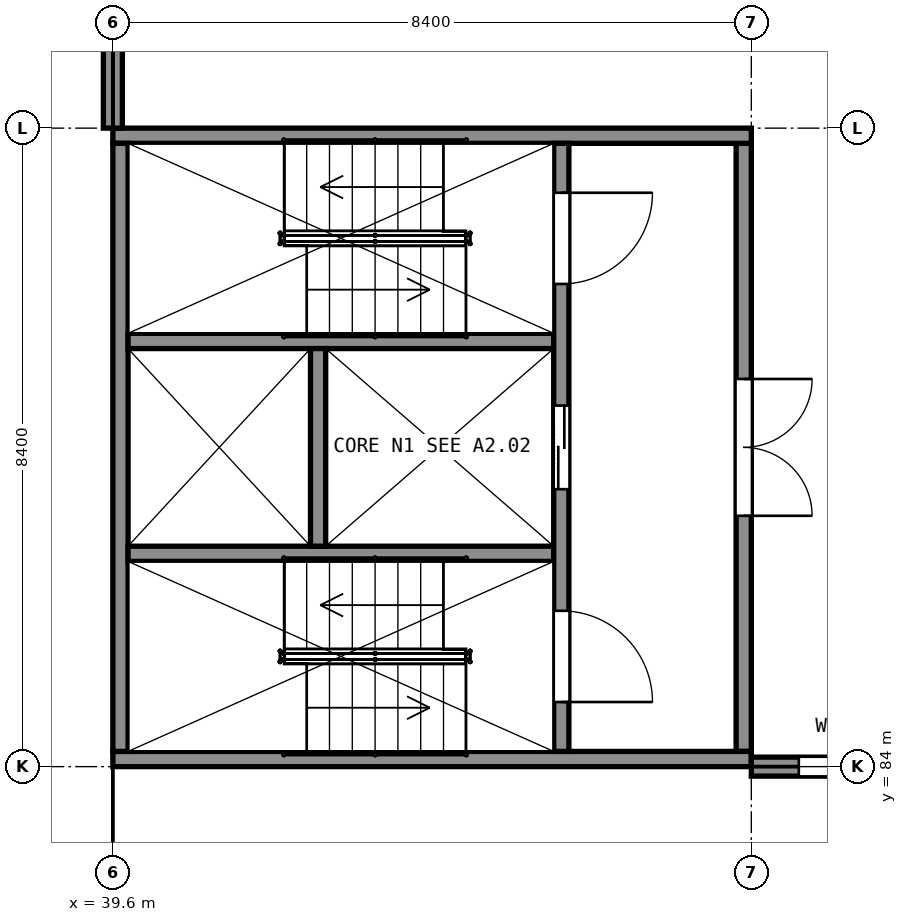
"""IFC4 building model, lengths in metres.
Left out: names, types, materials, properties, quantities, classifications, styles, units other than length and angle.
Written with IfcOpenShell. Run it as: python <this file> out.ifc"""

import sys

from ifc_helpers import new_model, si_unit, direction, frame, frame_2d, origin, place, context, subcontext, project, spatial, rectangle, extrude, element, fill, save


model = new_model("IFC4")
c1 = context("Model", 3, precision=1e-05, world=origin(), true_north=direction((0.0, 1.0)))
c2 = subcontext(c1, "Body", "Model", "MODEL_VIEW")
j1 = project(units=[si_unit("LENGTHUNIT", "METRE"), si_unit("PLANEANGLEUNIT", "RADIAN")], contexts=[c1])
p1 = place(None, origin())
s1 = spatial("IfcSite", under=j1, at=p1, CompositionType="ELEMENT")
p2 = place(p1, origin())
s2 = spatial("IfcBuilding", under=s1, at=p2, CompositionType="ELEMENT")
p3 = place(p2, frame((0.0, 0.0, 5.5)))
s3 = spatial("IfcBuildingStorey", under=s2, at=p3, CompositionType="ELEMENT", Elevation=5.5)
p4 = place(p3, frame((31.2, 83.9, 0.0), z_axis=(0.0, 0.0, 1.0), x_axis=(1.0, 0.0, 0.0)))
e1 = element("IfcWall", 1, at=p4, inside=s3, PredefinedType="SHEAR", context=c2, shape_type="SweptSolid", body=[
    extrude(rectangle(XDim=8.4, YDim=0.2, at=frame_2d((4.2, 0.0))), origin(), (0.0, 0.0, 1.0), 7.7),
])
p5 = place(p2, frame((0.0, 0.0, 10.5)))
s4 = spatial("IfcBuildingStorey", under=s2, at=p5, CompositionType="ELEMENT", Elevation=10.5)
for number, where, z_axis, x_axis in (
    (2, (39.6, 84.1, 0.0), (0.0, 0.0, 1.0), (1.0, 0.0, 0.0)),
    (3, (39.6, 92.3, 0.0), (0.0, 0.0, 1.0), (1.0, 0.0, 0.0)),
):
    element("IfcWall", number, at=place(p5, frame(where, z_axis=z_axis, x_axis=x_axis)), inside=s4, PredefinedType="SHEAR", context=c2, shape_type="SweptSolid", body=[
        extrude(rectangle(XDim=8.4, YDim=0.2, at=frame_2d((4.2, 0.0))), origin(), (0.0, 0.0, 1.0), 9.5),
    ])
p6 = place(p5, frame((39.7, 84.2, 0.0), z_axis=(0.0, 0.0, 1.0), x_axis=(0.0, 1.0, 0.0)))
e4 = element("IfcWall", 4, at=p6, inside=s4, PredefinedType="SHEAR", context=c2, shape_type="SweptSolid", body=[
    extrude(rectangle(XDim=8.0, YDim=0.2, at=frame_2d((4.0, 0.0))), origin(), (0.0, 0.0, 1.0), 9.5),
])
p7 = place(p5, frame((47.9, 84.2, 0.0), z_axis=(0.0, 0.0, 1.0), x_axis=(0.0, 1.0, 0.0)))
e5 = element("IfcWall", 5, at=p7, inside=s4, PredefinedType="SHEAR", context=c2, shape_type="SweptSolid", body=[
    extrude(rectangle(XDim=8.0, YDim=0.2, at=frame_2d((4.0, 0.0))), origin(), (0.0, 0.0, 1.0), 9.5),
])
p8 = place(p7, frame((3.1, 0.0, 0.0)))
e6 = element("IfcOpeningElement", 6, at=p8, cuts=e5, PredefinedType="OPENING", context=c2, shape_type="SweptSolid", body=[
    extrude(rectangle(XDim=1.8, YDim=2.1, at=frame_2d((0.9, 1.05))), frame((0.0, 0.11, 0.0), z_axis=(0.0, -1.0, 0.0), x_axis=(1.0, 0.0, 0.0)), (0.0, 0.0, 1.0), 0.22),
])
p9 = place(p5, frame((45.5, 84.2, 0.0), z_axis=(0.0, 0.0, 1.0), x_axis=(0.0, 1.0, 0.0)))
e7 = element("IfcWall", 7, at=p9, inside=s4, PredefinedType="SHEAR", context=c2, shape_type="SweptSolid", body=[
    extrude(rectangle(XDim=8.0, YDim=0.2, at=frame_2d((4.0, 0.0))), origin(), (0.0, 0.0, 1.0), 9.5),
])
p10 = place(p9, frame((0.65, 0.0, 0.0)))
e8 = element("IfcOpeningElement", 8, at=p10, cuts=e7, PredefinedType="OPENING", context=c2, shape_type="SweptSolid", body=[
    extrude(rectangle(XDim=1.2, YDim=2.1, at=frame_2d((0.6, 1.05))), frame((0.0, 0.11, 0.0), z_axis=(0.0, -1.0, 0.0), x_axis=(1.0, 0.0, 0.0)), (0.0, 0.0, 1.0), 0.22),
])
p11 = place(p9, frame((6.15, 0.0, 0.0)))
e9 = element("IfcOpeningElement", 9, at=p11, cuts=e7, PredefinedType="OPENING", context=c2, shape_type="SweptSolid", body=[
    extrude(rectangle(XDim=1.2, YDim=2.1, at=frame_2d((0.6, 1.05))), frame((0.0, 0.11, 0.0), z_axis=(0.0, -1.0, 0.0), x_axis=(1.0, 0.0, 0.0)), (0.0, 0.0, 1.0), 0.22),
])
p12 = place(p9, frame((3.45, 0.0, 0.0)))
e10 = element("IfcOpeningElement", 10, at=p12, cuts=e7, PredefinedType="OPENING", context=c2, shape_type="SweptSolid", body=[
    extrude(rectangle(XDim=1.1, YDim=2.1, at=frame_2d((0.55, 1.05))), frame((0.0, 0.11, 0.0), z_axis=(0.0, -1.0, 0.0), x_axis=(1.0, 0.0, 0.0)), (0.0, 0.0, 1.0), 0.22),
])
for number, where, z_axis, x_axis in (
    (11, (39.8, 86.8, 0.0), (0.0, 0.0, 1.0), (1.0, 0.0, 0.0)),
    (12, (39.8, 89.6, 0.0), (0.0, 0.0, 1.0), (1.0, 0.0, 0.0)),
):
    element("IfcWall", number, at=place(p5, frame(where, z_axis=z_axis, x_axis=x_axis)), inside=s4, PredefinedType="SHEAR", context=c2, shape_type="SweptSolid", body=[
        extrude(rectangle(XDim=5.6, YDim=0.2, at=frame_2d((2.8, 0.0))), origin(), (0.0, 0.0, 1.0), 9.5),
    ])
p13 = place(p5, frame((42.3, 86.9, 0.0), z_axis=(0.0, 0.0, 1.0), x_axis=(0.0, 1.0, 0.0)))
e13 = element("IfcWall", 13, at=p13, inside=s4, PredefinedType="SHEAR", context=c2, shape_type="SweptSolid", body=[
    extrude(rectangle(XDim=2.6, YDim=0.2, at=frame_2d((1.3, 0.0))), origin(), (0.0, 0.0, 1.0), 9.5),
])
p14 = place(p5, frame((39.6, 92.4, 0.0), z_axis=(0.0, 0.0, 1.0), x_axis=(0.0, 1.0, 0.0)))
e14 = element("IfcWall", 14, at=p14, inside=s4, PredefinedType="SOLIDWALL", context=c2, shape_type="SweptSolid", body=[
    extrude(rectangle(XDim=8.05, YDim=0.25, at=frame_2d((4.025, 0.0))), origin(), (0.0, 0.0, 1.0), 4.571),
])
p15 = place(p5, frame((48.0, 84.0, 0.0), z_axis=(0.0, 0.0, 1.0), x_axis=(1.0, 0.0, 0.0)))
e15 = element("IfcWall", 15, at=p15, inside=s4, PredefinedType="SOLIDWALL", context=c2, shape_type="SweptSolid", body=[
    extrude(rectangle(XDim=8.05, YDim=0.25, at=frame_2d((4.025, 0.0))), origin(), (0.0, 0.0, 1.0), 8.44),
])
p16 = place(p15, frame((0.625, 0.0, 0.9)))
e16 = element("IfcOpeningElement", 16, at=p16, cuts=e15, PredefinedType="OPENING", context=c2, shape_type="SweptSolid", body=[
    extrude(rectangle(XDim=1.2, YDim=6.0, at=frame_2d((0.6, 3.0))), frame((0.0, 0.135, 0.0), z_axis=(0.0, -1.0, 0.0), x_axis=(1.0, 0.0, 0.0)), (0.0, 0.0, 1.0), 0.27),
])
p17 = place(p15, frame((3.425, 0.0, 0.9)))
e17 = element("IfcOpeningElement", 17, at=p17, cuts=e15, PredefinedType="OPENING", context=c2, shape_type="SweptSolid", body=[
    extrude(rectangle(XDim=1.2, YDim=6.0, at=frame_2d((0.6, 3.0))), frame((0.0, 0.135, 0.0), z_axis=(0.0, -1.0, 0.0), x_axis=(1.0, 0.0, 0.0)), (0.0, 0.0, 1.0), 0.27),
])
p18 = place(p15, frame((6.225, 0.0, 0.9)))
e18 = element("IfcOpeningElement", 18, at=p18, cuts=e15, PredefinedType="OPENING", context=c2, shape_type="SweptSolid", body=[
    extrude(rectangle(XDim=1.2, YDim=6.0, at=frame_2d((0.6, 3.0))), frame((0.0, 0.135, 0.0), z_axis=(0.0, -1.0, 0.0), x_axis=(1.0, 0.0, 0.0)), (0.0, 0.0, 1.0), 0.27),
])
p19 = place(p16, origin())
e19 = element("IfcWindow", 19, at=p19, inside=s4, PartitioningType="SINGLE_PANEL", PredefinedType="WINDOW", context=c2, shape_type="SweptSolid", body=[
    extrude(rectangle(XDim=1.2, YDim=6.0, at=frame_2d((0.6, 3.0))), frame((0.0, 0.105, 0.0), z_axis=(0.0, -1.0, 0.0), x_axis=(1.0, 0.0, 0.0)), (0.0, 0.0, 1.0), 0.06),
])
fill(e16, e19)
p20 = place(p8, origin())
e20 = element("IfcDoor", 20, at=p20, inside=s4, OperationType="DOUBLE_DOOR_SINGLE_SWING", PredefinedType="DOOR", context=c2, shape_type="SweptSolid", body=[
    extrude(rectangle(XDim=1.8, YDim=2.1, at=frame_2d((0.9, 1.05))), frame((0.0, 0.025, 0.0), z_axis=(0.0, -1.0, 0.0), x_axis=(1.0, 0.0, 0.0)), (0.0, 0.0, 1.0), 0.05),
])
fill(e6, e20)
p21 = place(p10, origin())
e21 = element("IfcDoor", 21, at=p21, inside=s4, OperationType="SINGLE_SWING_LEFT", PredefinedType="DOOR", context=c2, shape_type="SweptSolid", body=[
    extrude(rectangle(XDim=1.2, YDim=2.1, at=frame_2d((0.6, 1.05))), frame((0.0, 0.025, 0.0), z_axis=(0.0, -1.0, 0.0), x_axis=(1.0, 0.0, 0.0)), (0.0, 0.0, 1.0), 0.05),
])
fill(e8, e21)
p22 = place(p11, origin())
e22 = element("IfcDoor", 22, at=p22, inside=s4, OperationType="SINGLE_SWING_RIGHT", PredefinedType="DOOR", context=c2, shape_type="SweptSolid", body=[
    extrude(rectangle(XDim=1.2, YDim=2.1, at=frame_2d((0.6, 1.05))), frame((0.0, 0.025, 0.0), z_axis=(0.0, -1.0, 0.0), x_axis=(1.0, 0.0, 0.0)), (0.0, 0.0, 1.0), 0.05),
])
fill(e9, e22)
p23 = place(p12, origin())
e23 = element("IfcDoor", 23, at=p23, inside=s4, OperationType="DOUBLE_DOOR_SLIDING", PredefinedType="DOOR", context=c2, shape_type="SweptSolid", body=[
    extrude(rectangle(XDim=1.1, YDim=2.1, at=frame_2d((0.55, 1.05))), frame((0.0, 0.025, 0.0), z_axis=(0.0, -1.0, 0.0), x_axis=(1.0, 0.0, 0.0)), (0.0, 0.0, 1.0), 0.05),
])
fill(e10, e23)
save(model, sys.argv[1])
